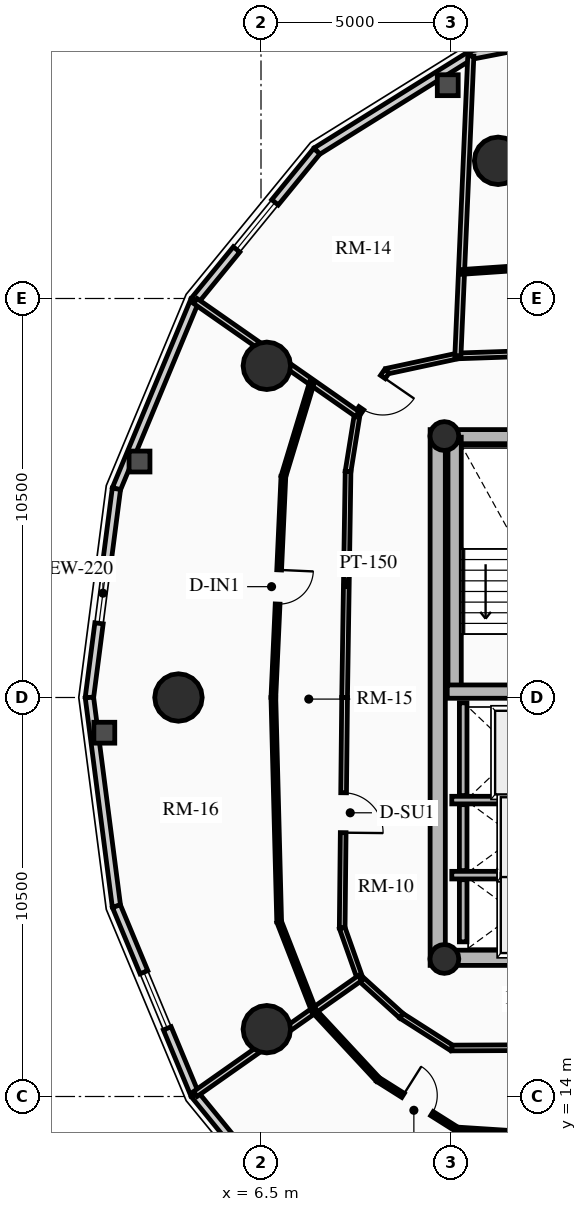
"""IFC4 building model, lengths in metres.
Left out: names, types, materials, properties, quantities, classifications, styles, units other than length and angle.
Written with IfcOpenShell. Run it as: python <this file> out.ifc"""

import sys

from ifc_helpers import new_model, si_unit, direction, frame, frame_2d, origin, origin_2d, place, context, subcontext, project, spatial, rectangle, circle, hollow_circle, extrude, source, transform, mapped, element, fill, save


model = new_model("IFC4")
c1 = context("Model", 3, precision=1e-05, world=origin(), true_north=direction((0.0, 1.0)))
c2 = subcontext(c1, "Body", "Model", "MODEL_VIEW")
j1 = project(units=[si_unit("LENGTHUNIT", "METRE"), si_unit("PLANEANGLEUNIT", "RADIAN")], contexts=[c1])
p1 = place(None, origin())
s1 = spatial("IfcSite", under=j1, at=p1, CompositionType="ELEMENT")
p2 = place(p1, origin())
s2 = spatial("IfcBuilding", under=s1, at=p2, CompositionType="ELEMENT")
p3 = place(p2, frame((0.0, 0.0, 166.15)))
s3 = spatial("IfcBuildingStorey", under=s2, at=p3, CompositionType="ELEMENT", Elevation=166.15)
p4 = place(p3, frame((11.15, 17.45, 0.0), z_axis=(0.0, 0.0, 1.0), x_axis=(0.0, 1.0, 0.0)))
e1 = element("IfcWall", 1, at=p4, inside=s3, PredefinedType="SHEAR", context=c2, shape_type="SweptSolid", body=[
    extrude(rectangle(XDim=14.1, YDim=0.4, at=frame_2d((7.05, 0.0))), origin(), (0.0, 0.0, 1.0), 2.91),
])
p5 = place(p3, frame((11.15, 17.65, 0.0), z_axis=(0.0, 0.0, 1.0), x_axis=(1.0, 0.0, 0.0)))
e2 = element("IfcWall", 2, at=p5, inside=s3, PredefinedType="SHEAR", context=c2, shape_type="SweptSolid", body=[
    extrude(rectangle(XDim=10.7, YDim=0.4, at=frame_2d((5.35, 0.0))), origin(), (0.0, 0.0, 1.0), 2.91),
])
m1 = source(origin(), c2, "Body", "SweptSolid", [
    extrude(rectangle(XDim=1.5, YDim=2.02, at=frame_2d((0.75, 1.01))), frame((0.0, 0.21, 0.0), z_axis=(0.0, -1.0, 0.0), x_axis=(1.0, 0.0, 0.0)), (0.0, 0.0, 1.0), 0.42),
])
p6 = place(p5, frame((5.45, 0.0, 0.0)))
e3 = element("IfcOpeningElement", 3, at=p6, cuts=e2, PredefinedType="OPENING", context=c2, shape_type="MappedRepresentation", body=[
    mapped(m1, transform((0.0, 0.0, 0.0), x_axis=(1.0, 0.0, 0.0), y_axis=(0.0, 1.0, 0.0), z_axis=(0.0, 0.0, 1.0), scale=1.0)),
])
p7 = place(p3, frame((11.15, 31.35, 0.0), z_axis=(0.0, 0.0, 1.0), x_axis=(1.0, 0.0, 0.0)))
e4 = element("IfcWall", 4, at=p7, inside=s3, PredefinedType="SHEAR", context=c2, shape_type="SweptSolid", body=[
    extrude(rectangle(XDim=10.7, YDim=0.4, at=frame_2d((5.35, 0.0))), origin(), (0.0, 0.0, 1.0), 2.91),
])
p8 = place(p7, frame((4.6, 0.0, 0.0)))
e5 = element("IfcOpeningElement", 5, at=p8, cuts=e4, PredefinedType="OPENING", context=c2, shape_type="MappedRepresentation", body=[
    mapped(m1, transform((0.0, 0.0, 0.0), x_axis=(1.0, 0.0, 0.0), y_axis=(0.0, 1.0, 0.0), z_axis=(0.0, 0.0, 1.0), scale=1.0)),
])
p9 = place(p3, frame((11.595, 24.655, 0.0), z_axis=(0.0, 0.0, 1.0), x_axis=(0.0, 1.0, 0.0)))
e6 = element("IfcWall", 6, at=p9, inside=s3, PredefinedType="SHEAR", context=c2, shape_type="SweptSolid", body=[
    extrude(rectangle(XDim=6.695, YDim=0.35, at=frame_2d((3.348, 0.0))), origin(), (0.0, 0.0, 1.0), 2.91),
])
p10 = place(p3, frame((11.4, 24.655, 0.0), z_axis=(0.0, 0.0, 1.0), x_axis=(1.0, 0.0, 0.0)))
e7 = element("IfcWall", 7, at=p10, inside=s3, PredefinedType="SHEAR", context=c2, shape_type="SweptSolid", body=[
    extrude(rectangle(XDim=3.285, YDim=0.35, at=frame_2d((1.643, 0.0))), origin(), (0.0, 0.0, 1.0), 2.91),
])
for number, where, z_axis, x_axis in (
    (8, (11.325, 17.62, 0.0), (0.0, 0.0, 1.0), (1.0, 0.0, 0.0)),
    (9, (11.325, 31.38, 0.0), (0.0, 0.0, 1.0), (1.0, 0.0, 0.0)),
):
    element("IfcColumn", number, at=place(p3, frame(where, z_axis=z_axis, x_axis=x_axis)), inside=s3, PredefinedType="COLUMN", context=c2, shape_type="SweptSolid", body=[
        extrude(hollow_circle(Radius=0.38, WallThickness=0.032, at=origin_2d()), origin(), (0.0, 0.0, 1.0), 2.91),
    ])
for number, where, z_axis, x_axis in (
    (10, (12.739, 38.623, 0.0), (0.0, 0.0, 1.0), (1.0, 0.0, 0.0)),
    (11, (6.653, 33.229, 0.0), (0.0, 0.0, 1.0), (1.0, 0.0, 0.0)),
    (12, (4.328, 24.5, 0.0), (0.0, 0.0, 1.0), (1.0, 0.0, 0.0)),
    (13, (6.653, 15.771, 0.0), (0.0, 0.0, 1.0), (1.0, 0.0, 0.0)),
):
    element("IfcColumn", number, at=place(p3, frame(where, z_axis=z_axis, x_axis=x_axis)), inside=s3, PredefinedType="USERDEFINED", context=c2, shape_type="SweptSolid", body=[
        extrude(circle(Radius=0.625, at=origin_2d()), origin(), (0.0, 0.0, 1.0), 2.91),
    ])
p11 = place(p3, frame((12.015, 41.4, 0.0), z_axis=(0.0, 0.0, 1.0), x_axis=(0.981718699963, 0.190337579429, 0.0)))
e14 = element("IfcWall", 14, at=p11, inside=s3, PredefinedType="SOLIDWALL", context=c2, shape_type="SweptSolid", body=[
    extrude(rectangle(XDim=4.569, YDim=0.22, at=frame_2d((2.284, 0.0))), origin(), (0.0, 0.0, 1.0), 2.675),
])
m2 = source(origin(), c2, "Body", "SweptSolid", [
    extrude(rectangle(XDim=1.6, YDim=1.3, at=frame_2d((0.8, 0.65))), frame((0.0, 0.12, 0.0), z_axis=(0.0, -1.0, 0.0), x_axis=(1.0, 0.0, 0.0)), (0.0, 0.0, 1.0), 0.24),
])
p12 = place(p11, frame((1.484, 0.0, 0.65)))
e15 = element("IfcOpeningElement", 15, at=p12, cuts=e14, PredefinedType="OPENING", context=c2, shape_type="MappedRepresentation", body=[
    mapped(m2, transform((0.0, 0.0, 0.0), x_axis=(1.0, 0.0, 0.0), y_axis=(0.0, 1.0, 0.0), z_axis=(0.0, 0.0, 1.0), scale=1.0)),
])
p13 = place(p3, frame((7.968, 38.876, 0.0), z_axis=(0.0, 0.0, 1.0), x_axis=(0.848452391194, 0.529271707044, 0.0)))
e16 = element("IfcWall", 16, at=p13, inside=s3, PredefinedType="SOLIDWALL", context=c2, shape_type="SweptSolid", body=[
    extrude(rectangle(XDim=4.769, YDim=0.22, at=frame_2d((2.385, 0.0))), origin(), (0.0, 0.0, 1.0), 2.675),
])
p14 = place(p3, frame((4.757, 34.945, 0.0), z_axis=(0.0, 0.0, 1.0), x_axis=(0.632598524901, 0.774479894053, 0.0)))
e17 = element("IfcWall", 17, at=p14, inside=s3, PredefinedType="SOLIDWALL", context=c2, shape_type="SweptSolid", body=[
    extrude(rectangle(XDim=5.076, YDim=0.22, at=frame_2d((2.538, 0.0))), origin(), (0.0, 0.0, 1.0), 2.675),
])
p15 = place(p14, frame((1.738, 0.0, 0.65)))
e18 = element("IfcOpeningElement", 18, at=p15, cuts=e17, PredefinedType="OPENING", context=c2, shape_type="MappedRepresentation", body=[
    mapped(m2, transform((0.0, 0.0, 0.0), x_axis=(1.0, 0.0, 0.0), y_axis=(0.0, 1.0, 0.0), z_axis=(0.0, 0.0, 1.0), scale=1.0)),
])
p16 = place(p3, frame((2.695, 29.991, 0.0), z_axis=(0.0, 0.0, 1.0), x_axis=(0.384259959969, 0.923224936386, 0.0)))
e19 = element("IfcWall", 19, at=p16, inside=s3, PredefinedType="SOLIDWALL", context=c2, shape_type="SweptSolid", body=[
    extrude(rectangle(XDim=5.365, YDim=0.22, at=frame_2d((2.683, 0.0))), origin(), (0.0, 0.0, 1.0), 2.675),
])
p17 = place(p3, frame((1.985, 24.5, 0.0), z_axis=(0.0, 0.0, 1.0), x_axis=(0.128266533912, 0.991739732126, 0.0)))
e20 = element("IfcWall", 20, at=p17, inside=s3, PredefinedType="SOLIDWALL", context=c2, shape_type="SweptSolid", body=[
    extrude(rectangle(XDim=5.537, YDim=0.22, at=frame_2d((2.769, 0.0))), origin(), (0.0, 0.0, 1.0), 2.675),
])
p18 = place(p17, frame((1.968, 0.0, 0.65)))
e21 = element("IfcOpeningElement", 21, at=p18, cuts=e20, PredefinedType="OPENING", context=c2, shape_type="MappedRepresentation", body=[
    mapped(m2, transform((0.0, 0.0, 0.0), x_axis=(1.0, 0.0, 0.0), y_axis=(0.0, 1.0, 0.0), z_axis=(0.0, 0.0, 1.0), scale=1.0)),
])
p19 = place(p3, frame((2.695, 19.009, 0.0), z_axis=(0.0, 0.0, 1.0), x_axis=(-0.128266533912, 0.991739732126, 0.0)))
e22 = element("IfcWall", 22, at=p19, inside=s3, PredefinedType="SOLIDWALL", context=c2, shape_type="SweptSolid", body=[
    extrude(rectangle(XDim=5.537, YDim=0.22, at=frame_2d((2.769, 0.0))), origin(), (0.0, 0.0, 1.0), 2.675),
])
p20 = place(p3, frame((4.757, 14.055, 0.0), z_axis=(0.0, 0.0, 1.0), x_axis=(-0.384259959969, 0.923224936386, 0.0)))
e23 = element("IfcWall", 23, at=p20, inside=s3, PredefinedType="SOLIDWALL", context=c2, shape_type="SweptSolid", body=[
    extrude(rectangle(XDim=5.365, YDim=0.22, at=frame_2d((2.683, 0.0))), origin(), (0.0, 0.0, 1.0), 2.675),
])
p21 = place(p20, frame((1.883, 0.0, 0.65)))
e24 = element("IfcOpeningElement", 24, at=p21, cuts=e23, PredefinedType="OPENING", context=c2, shape_type="MappedRepresentation", body=[
    mapped(m2, transform((0.0, 0.0, 0.0), x_axis=(1.0, 0.0, 0.0), y_axis=(0.0, 1.0, 0.0), z_axis=(0.0, 0.0, 1.0), scale=1.0)),
])
p22 = place(p3, frame((7.968, 10.124, 0.0), z_axis=(0.0, 0.0, 1.0), x_axis=(-0.632598524901, 0.774479894053, 0.0)))
e25 = element("IfcWall", 25, at=p22, inside=s3, PredefinedType="SOLIDWALL", context=c2, shape_type="SweptSolid", body=[
    extrude(rectangle(XDim=5.076, YDim=0.22, at=frame_2d((2.538, 0.0))), origin(), (0.0, 0.0, 1.0), 2.675),
])
p23 = place(p3, frame((11.52, 21.8, 0.0), z_axis=(0.0, 0.0, 1.0), x_axis=(1.0, 0.0, 0.0)))
e26 = element("IfcWall", 26, at=p23, inside=s3, PredefinedType="SHEAR", context=c2, shape_type="SweptSolid", body=[
    extrude(rectangle(XDim=2.97, YDim=0.2, at=frame_2d((1.485, 0.0))), origin(), (0.0, 0.0, 1.0), 2.91),
])
p24 = place(p3, frame((11.82, 21.92, 0.0), z_axis=(0.0, 0.0, 1.0), x_axis=(0.0, 1.0, 0.0)))
e27 = element("IfcWall", 27, at=p24, inside=s3, PredefinedType="SHEAR", context=c2, shape_type="SweptSolid", body=[
    extrude(rectangle(XDim=2.44, YDim=0.2, at=frame_2d((1.22, 0.0))), origin(), (0.0, 0.0, 1.0), 2.91),
])
p25 = place(p3, frame((11.52, 19.825, 0.0), z_axis=(0.0, 0.0, 1.0), x_axis=(1.0, 0.0, 0.0)))
e28 = element("IfcWall", 28, at=p25, inside=s3, PredefinedType="SHEAR", context=c2, shape_type="SweptSolid", body=[
    extrude(rectangle(XDim=2.97, YDim=0.2, at=frame_2d((1.485, 0.0))), origin(), (0.0, 0.0, 1.0), 2.91),
])
p26 = place(p3, frame((11.82, 19.945, 0.0), z_axis=(0.0, 0.0, 1.0), x_axis=(0.0, 1.0, 0.0)))
e29 = element("IfcWall", 29, at=p26, inside=s3, PredefinedType="SHEAR", context=c2, shape_type="SweptSolid", body=[
    extrude(rectangle(XDim=1.735, YDim=0.2, at=frame_2d((0.867, 0.0))), origin(), (0.0, 0.0, 1.0), 2.91),
])
p27 = place(p3, frame((11.82, 18.07, 0.0), z_axis=(0.0, 0.0, 1.0), x_axis=(0.0, 1.0, 0.0)))
e30 = element("IfcWall", 30, at=p27, inside=s3, PredefinedType="SHEAR", context=c2, shape_type="SweptSolid", body=[
    extrude(rectangle(XDim=1.635, YDim=0.2, at=frame_2d((0.817, 0.0))), origin(), (0.0, 0.0, 1.0), 2.91),
])
p28 = place(p3, frame((18.123, 33.709, 0.0), z_axis=(0.0, 0.0, 1.0), x_axis=(-0.999417459976, -0.034128297572, 0.0)))
e31 = element("IfcWall", 31, at=p28, inside=s3, PredefinedType="PARTITIONING", context=c2, shape_type="SweptSolid", body=[
    extrude(rectangle(XDim=6.445, YDim=0.15, at=frame_2d((3.223, 0.0))), origin(), (0.0, 0.0, 1.0), 2.245),
])
p29 = place(p3, frame((11.681, 33.49, 0.0), z_axis=(0.0, 0.0, 1.0), x_axis=(-0.977628265995, -0.2103401377, 0.0)))
e32 = element("IfcWall", 32, at=p29, inside=s3, PredefinedType="PARTITIONING", context=c2, shape_type="SweptSolid", body=[
    extrude(rectangle(XDim=1.912, YDim=0.15, at=frame_2d((0.956, 0.0))), origin(), (0.0, 0.0, 1.0), 2.245),
])
p30 = place(p3, frame((9.812, 33.087, 0.0), z_axis=(0.0, 0.0, 1.0), x_axis=(-0.567811958729, -0.823158295545, 0.0)))
e33 = element("IfcWall", 33, at=p30, inside=s3, PredefinedType="PARTITIONING", context=c2, shape_type="SweptSolid", body=[
    extrude(rectangle(XDim=1.372, YDim=0.15, at=frame_2d((0.686, 0.0))), origin(), (0.0, 0.0, 1.0), 2.245),
])
m3 = source(origin(), c2, "Body", "SweptSolid", [
    extrude(rectangle(XDim=1.0, YDim=2.015, at=frame_2d((0.5, 1.007))), frame((0.0, 0.085, 0.0), z_axis=(0.0, -1.0, 0.0), x_axis=(1.0, 0.0, 0.0)), (0.0, 0.0, 1.0), 0.17),
])
p31 = place(p30, frame((0.186, 0.0, 0.0)))
e34 = element("IfcOpeningElement", 34, at=p31, cuts=e33, PredefinedType="OPENING", context=c2, shape_type="MappedRepresentation", body=[
    mapped(m3, transform((0.0, 0.0, 0.0), x_axis=(1.0, 0.0, 0.0), y_axis=(0.0, 1.0, 0.0), z_axis=(0.0, 0.0, 1.0), scale=1.0)),
])
p32 = place(p3, frame((9.033, 31.958, 0.0), z_axis=(0.0, 0.0, 1.0), x_axis=(-0.158344987388, -0.98738384885, 0.0)))
e35 = element("IfcWall", 35, at=p32, inside=s3, PredefinedType="PARTITIONING", context=c2, shape_type="SweptSolid", body=[
    extrude(rectangle(XDim=1.531, YDim=0.15, at=frame_2d((0.766, 0.0))), origin(), (0.0, 0.0, 1.0), 2.245),
])
p33 = place(p3, frame((8.791, 30.446, 0.0), z_axis=(0.0, 0.0, 1.0), x_axis=(-0.015230619426, -0.999884007389, 0.0)))
e36 = element("IfcWall", 36, at=p33, inside=s3, PredefinedType="PARTITIONING", context=c2, shape_type="SweptSolid", body=[
    extrude(rectangle(XDim=5.947, YDim=0.15, at=frame_2d((2.974, 0.0))), origin(), (0.0, 0.0, 1.0), 2.675),
])
p34 = place(p3, frame((8.7, 24.5, 0.0), z_axis=(0.0, 0.0, 1.0), x_axis=(-0.010507512335, -0.999944794568, 0.0)))
e37 = element("IfcWall", 37, at=p34, inside=s3, PredefinedType="PARTITIONING", context=c2, shape_type="SweptSolid", body=[
    extrude(rectangle(XDim=6.064, YDim=0.15, at=frame_2d((3.032, 0.0))), origin(), (0.0, 0.0, 1.0), 2.245),
])
m4 = source(origin(), c2, "Body", "SweptSolid", [
    extrude(rectangle(XDim=1.05, YDim=2.015, at=frame_2d((0.525, 1.007))), frame((0.0, 0.085, 0.0), z_axis=(0.0, -1.0, 0.0), x_axis=(1.0, 0.0, 0.0)), (0.0, 0.0, 1.0), 0.17),
])
p35 = place(p34, frame((2.507, 0.0, 0.0)))
e38 = element("IfcOpeningElement", 38, at=p35, cuts=e37, PredefinedType="OPENING", context=c2, shape_type="MappedRepresentation", body=[
    mapped(m4, transform((0.0, 0.0, 0.0), x_axis=(1.0, 0.0, 0.0), y_axis=(0.0, 1.0, 0.0), z_axis=(0.0, 0.0, 1.0), scale=1.0)),
])
p36 = place(p3, frame((8.636, 18.436, 0.0), z_axis=(0.0, 0.0, 1.0), x_axis=(0.333211866524, -0.942851977782, 0.0)))
e39 = element("IfcWall", 39, at=p36, inside=s3, PredefinedType="PARTITIONING", context=c2, shape_type="SweptSolid", body=[
    extrude(rectangle(XDim=1.402, YDim=0.15, at=frame_2d((0.701, 0.0))), origin(), (0.0, 0.0, 1.0), 2.245),
])
p37 = place(p3, frame((9.103, 17.115, 0.0), z_axis=(0.0, 0.0, 1.0), x_axis=(0.740186897911, -0.672401186912, 0.0)))
e40 = element("IfcWall", 40, at=p37, inside=s3, PredefinedType="PARTITIONING", context=c2, shape_type="SweptSolid", body=[
    extrude(rectangle(XDim=1.477, YDim=0.15, at=frame_2d((0.738, 0.0))), origin(), (0.0, 0.0, 1.0), 2.245),
])
p38 = place(p3, frame((10.196, 16.122, 0.0), z_axis=(0.0, 0.0, 1.0), x_axis=(0.843021142441, -0.537880426673, 0.0)))
e41 = element("IfcWall", 41, at=p38, inside=s3, PredefinedType="PARTITIONING", context=c2, shape_type="SweptSolid", body=[
    extrude(rectangle(XDim=1.571, YDim=0.15, at=frame_2d((0.786, 0.0))), origin(), (0.0, 0.0, 1.0), 2.245),
])
p39 = place(p3, frame((11.521, 15.276, 0.0), z_axis=(0.0, 0.0, 1.0), x_axis=(0.999990688463, 0.004315436007, 0.0)))
e42 = element("IfcWall", 42, at=p39, inside=s3, PredefinedType="PARTITIONING", context=c2, shape_type="SweptSolid", body=[
    extrude(rectangle(XDim=3.281, YDim=0.15, at=frame_2d((1.641, 0.0))), origin(), (0.0, 0.0, 1.0), 2.245),
])
p40 = place(p39, frame((1.613, 0.0, 0.0)))
e43 = element("IfcOpeningElement", 43, at=p40, cuts=e42, PredefinedType="OPENING", context=c2, shape_type="MappedRepresentation", body=[
    mapped(m4, transform((0.0, 0.0, 0.0), x_axis=(1.0, 0.0, 0.0), y_axis=(0.0, 1.0, 0.0), z_axis=(0.0, 0.0, 1.0), scale=1.0)),
])
p41 = place(p3, frame((11.681, 33.49, 0.0), z_axis=(0.0, 0.0, 1.0), x_axis=(0.043022772958, 0.999074091851, 0.0)))
e44 = element("IfcWall", 44, at=p41, inside=s3, PredefinedType="PARTITIONING", context=c2, shape_type="SweptSolid", body=[
    extrude(rectangle(XDim=7.899, YDim=0.16, at=frame_2d((3.95, 0.0))), origin(), (0.0, 0.0, 1.0), 2.245),
])
p42 = place(p3, frame((9.033, 31.958, 0.0), z_axis=(0.0, 0.0, 1.0), x_axis=(-0.819840720998, 0.572591645236, 0.0)))
e45 = element("IfcWall", 45, at=p42, inside=s3, PredefinedType="PARTITIONING", context=c2, shape_type="SweptSolid", body=[
    extrude(rectangle(XDim=5.196, YDim=0.16, at=frame_2d((2.598, 0.0))), origin(), (0.0, 0.0, 1.0), 2.245),
])
p43 = place(p3, frame((9.103, 17.115, 0.0), z_axis=(0.0, 0.0, 1.0), x_axis=(-0.817760605426, -0.575558504597, 0.0)))
e46 = element("IfcWall", 46, at=p43, inside=s3, PredefinedType="PARTITIONING", context=c2, shape_type="SweptSolid", body=[
    extrude(rectangle(XDim=5.295, YDim=0.16, at=frame_2d((2.647, 0.0))), origin(), (0.0, 0.0, 1.0), 2.245),
])
p44 = place(p3, frame((17.668, 36.101, 0.0), z_axis=(0.0, 0.0, 1.0), x_axis=(-0.997685095246, -0.068003314066, 0.0)))
e47 = element("IfcWall", 47, at=p44, inside=s3, PredefinedType="PARTITIONING", context=c2, shape_type="SweptSolid", body=[
    extrude(rectangle(XDim=5.906, YDim=0.125, at=frame_2d((2.953, 0.0))), origin(), (0.0, 0.0, 1.0), 2.245),
])
p45 = place(p3, frame((7.84, 32.791, 0.0), z_axis=(0.0, 0.0, 1.0), x_axis=(-0.290387415435, -0.956909164423, 0.0)))
e48 = element("IfcWall", 48, at=p45, inside=s3, PredefinedType="PARTITIONING", context=c2, shape_type="SweptSolid", body=[
    extrude(rectangle(XDim=2.585, YDim=0.125, at=frame_2d((1.292, 0.0))), origin(), (0.0, 0.0, 1.0), 2.245),
])
p46 = place(p3, frame((7.089, 30.317, 0.0), z_axis=(0.0, 0.0, 1.0), x_axis=(-0.045322079706, -0.998972426592, 0.0)))
e49 = element("IfcWall", 49, at=p46, inside=s3, PredefinedType="PARTITIONING", context=c2, shape_type="SweptSolid", body=[
    extrude(rectangle(XDim=5.823, YDim=0.125, at=frame_2d((2.912, 0.0))), origin(), (0.0, 0.0, 1.0), 2.675),
])
m5 = source(origin(), c2, "Body", "SweptSolid", [
    extrude(rectangle(XDim=0.9, YDim=2.005, at=frame_2d((0.45, 1.002))), frame((0.0, 0.073, 0.0), z_axis=(0.0, -1.0, 0.0), x_axis=(1.0, 0.0, 0.0)), (0.0, 0.0, 1.0), 0.145),
])
p47 = place(p46, frame((2.462, 0.0, 0.0)))
e50 = element("IfcOpeningElement", 50, at=p47, cuts=e49, PredefinedType="OPENING", context=c2, shape_type="MappedRepresentation", body=[
    mapped(m5, transform((0.0, 0.0, 0.0), x_axis=(1.0, 0.0, 0.0), y_axis=(0.0, 1.0, 0.0), z_axis=(0.0, 0.0, 1.0), scale=1.0)),
])
p48 = place(p3, frame((6.825, 24.5, 0.0), z_axis=(0.0, 0.0, 1.0), x_axis=(0.025845586866, -0.999665947024, 0.0)))
e51 = element("IfcWall", 51, at=p48, inside=s3, PredefinedType="PARTITIONING", context=c2, shape_type="SweptSolid", body=[
    extrude(rectangle(XDim=5.904, YDim=0.125, at=frame_2d((2.952, 0.0))), origin(), (0.0, 0.0, 1.0), 2.245),
])
p49 = place(p3, frame((6.978, 18.598, 0.0), z_axis=(0.0, 0.0, 1.0), x_axis=(0.363845250376, -0.931459410698, 0.0)))
e52 = element("IfcWall", 52, at=p49, inside=s3, PredefinedType="PARTITIONING", context=c2, shape_type="SweptSolid", body=[
    extrude(rectangle(XDim=2.509, YDim=0.125, at=frame_2d((1.254, 0.0))), origin(), (0.0, 0.0, 1.0), 2.245),
])
p50 = place(p3, frame((7.891, 16.261, 0.0), z_axis=(0.0, 0.0, 1.0), x_axis=(0.680443535441, -0.7328005152, 0.0)))
e53 = element("IfcWall", 53, at=p50, inside=s3, PredefinedType="PARTITIONING", context=c2, shape_type="SweptSolid", body=[
    extrude(rectangle(XDim=2.476, YDim=0.125, at=frame_2d((1.238, 0.0))), origin(), (0.0, 0.0, 1.0), 2.245),
])
p51 = place(p3, frame((9.576, 14.447, 0.0), z_axis=(0.0, 0.0, 1.0), x_axis=(0.845905204383, -0.53333327779, 0.0)))
e54 = element("IfcWall", 54, at=p51, inside=s3, PredefinedType="PARTITIONING", context=c2, shape_type="SweptSolid", body=[
    extrude(rectangle(XDim=2.465, YDim=0.125, at=frame_2d((1.232, 0.0))), origin(), (0.0, 0.0, 1.0), 2.245),
])
p52 = place(p51, frame((0.782, 0.0, 0.0)))
e55 = element("IfcOpeningElement", 55, at=p52, cuts=e54, PredefinedType="OPENING", context=c2, shape_type="MappedRepresentation", body=[
    mapped(m5, transform((0.0, 0.0, 0.0), x_axis=(1.0, 0.0, 0.0), y_axis=(0.0, 1.0, 0.0), z_axis=(0.0, 0.0, 1.0), scale=1.0)),
])
p53 = place(p3, frame((11.661, 13.132, 0.0), z_axis=(0.0, 0.0, 1.0), x_axis=(0.997932841329, -0.064265419915, 0.0)))
e56 = element("IfcWall", 56, at=p53, inside=s3, PredefinedType="PARTITIONING", context=c2, shape_type="SweptSolid", body=[
    extrude(rectangle(XDim=3.624, YDim=0.125, at=frame_2d((1.812, 0.0))), origin(), (0.0, 0.0, 1.0), 2.245),
])
m6 = source(origin(), c2, "Body", "SweptSolid", [
    extrude(rectangle(XDim=1.6, YDim=1.3, at=frame_2d((0.8, 0.65))), frame((0.0, 0.03, 0.0), z_axis=(0.0, -1.0, 0.0), x_axis=(1.0, 0.0, 0.0)), (0.0, 0.0, 1.0), 0.06),
])
p54 = place(p15, origin())
e57 = element("IfcWindow", 57, at=p54, inside=s3, PartitioningType="SINGLE_PANEL", PredefinedType="WINDOW", context=c2, shape_type="MappedRepresentation", body=[
    mapped(m6, transform((0.0, 0.0, 0.0), x_axis=(1.0, 0.0, 0.0), y_axis=(0.0, 1.0, 0.0), z_axis=(0.0, 0.0, 1.0), scale=1.0)),
])
fill(e18, e57)
p55 = place(p18, origin())
e58 = element("IfcWindow", 58, at=p55, inside=s3, PartitioningType="SINGLE_PANEL", PredefinedType="WINDOW", context=c2, shape_type="MappedRepresentation", body=[
    mapped(m6, transform((0.0, 0.0, 0.0), x_axis=(1.0, 0.0, 0.0), y_axis=(0.0, 1.0, 0.0), z_axis=(0.0, 0.0, 1.0), scale=1.0)),
])
fill(e21, e58)
p56 = place(p21, origin())
e59 = element("IfcWindow", 59, at=p56, inside=s3, PartitioningType="SINGLE_PANEL", PredefinedType="WINDOW", context=c2, shape_type="MappedRepresentation", body=[
    mapped(m6, transform((0.0, 0.0, 0.0), x_axis=(1.0, 0.0, 0.0), y_axis=(0.0, 1.0, 0.0), z_axis=(0.0, 0.0, 1.0), scale=1.0)),
])
fill(e24, e59)
m7 = source(origin(), c2, "Body", "SweptSolid", [
    extrude(rectangle(XDim=1.0, YDim=2.015, at=frame_2d((0.5, 1.007))), frame((0.0, 0.025, 0.0), z_axis=(0.0, -1.0, 0.0), x_axis=(1.0, 0.0, 0.0)), (0.0, 0.0, 1.0), 0.05),
])
p57 = place(p31, origin())
e60 = element("IfcDoor", 60, at=p57, inside=s3, OperationType="SINGLE_SWING_LEFT", PredefinedType="DOOR", context=c2, shape_type="MappedRepresentation", body=[
    mapped(m7, transform((0.0, 0.0, 0.0), x_axis=(1.0, 0.0, 0.0), y_axis=(0.0, 1.0, 0.0), z_axis=(0.0, 0.0, 1.0), scale=1.0)),
])
fill(e34, e60)
m8 = source(origin(), c2, "Body", "SweptSolid", [
    extrude(rectangle(XDim=1.05, YDim=2.015, at=frame_2d((0.525, 1.007))), frame((0.0, 0.025, 0.0), z_axis=(0.0, -1.0, 0.0), x_axis=(1.0, 0.0, 0.0)), (0.0, 0.0, 1.0), 0.05),
])
p58 = place(p35, origin())
e61 = element("IfcDoor", 61, at=p58, inside=s3, OperationType="SINGLE_SWING_RIGHT", PredefinedType="DOOR", context=c2, shape_type="MappedRepresentation", body=[
    mapped(m8, transform((0.0, 0.0, 0.0), x_axis=(1.0, 0.0, 0.0), y_axis=(0.0, 1.0, 0.0), z_axis=(0.0, 0.0, 1.0), scale=1.0)),
])
fill(e38, e61)
m9 = source(origin(), c2, "Body", "SweptSolid", [
    extrude(rectangle(XDim=0.9, YDim=2.005, at=frame_2d((0.45, 1.002))), frame((0.0, 0.025, 0.0), z_axis=(0.0, -1.0, 0.0), x_axis=(1.0, 0.0, 0.0)), (0.0, 0.0, 1.0), 0.05),
])
p59 = place(p47, origin())
e62 = element("IfcDoor", 62, at=p59, inside=s3, OperationType="SINGLE_SWING_LEFT", PredefinedType="DOOR", context=c2, shape_type="MappedRepresentation", body=[
    mapped(m9, transform((0.0, 0.0, 0.0), x_axis=(1.0, 0.0, 0.0), y_axis=(0.0, 1.0, 0.0), z_axis=(0.0, 0.0, 1.0), scale=1.0)),
])
fill(e50, e62)
p60 = place(p52, origin())
e63 = element("IfcDoor", 63, at=p60, inside=s3, OperationType="SINGLE_SWING_LEFT", PredefinedType="DOOR", context=c2, shape_type="MappedRepresentation", body=[
    mapped(m9, transform((0.0, 0.0, 0.0), x_axis=(1.0, 0.0, 0.0), y_axis=(0.0, 1.0, 0.0), z_axis=(0.0, 0.0, 1.0), scale=1.0)),
])
fill(e55, e63)
save(model, sys.argv[1])
